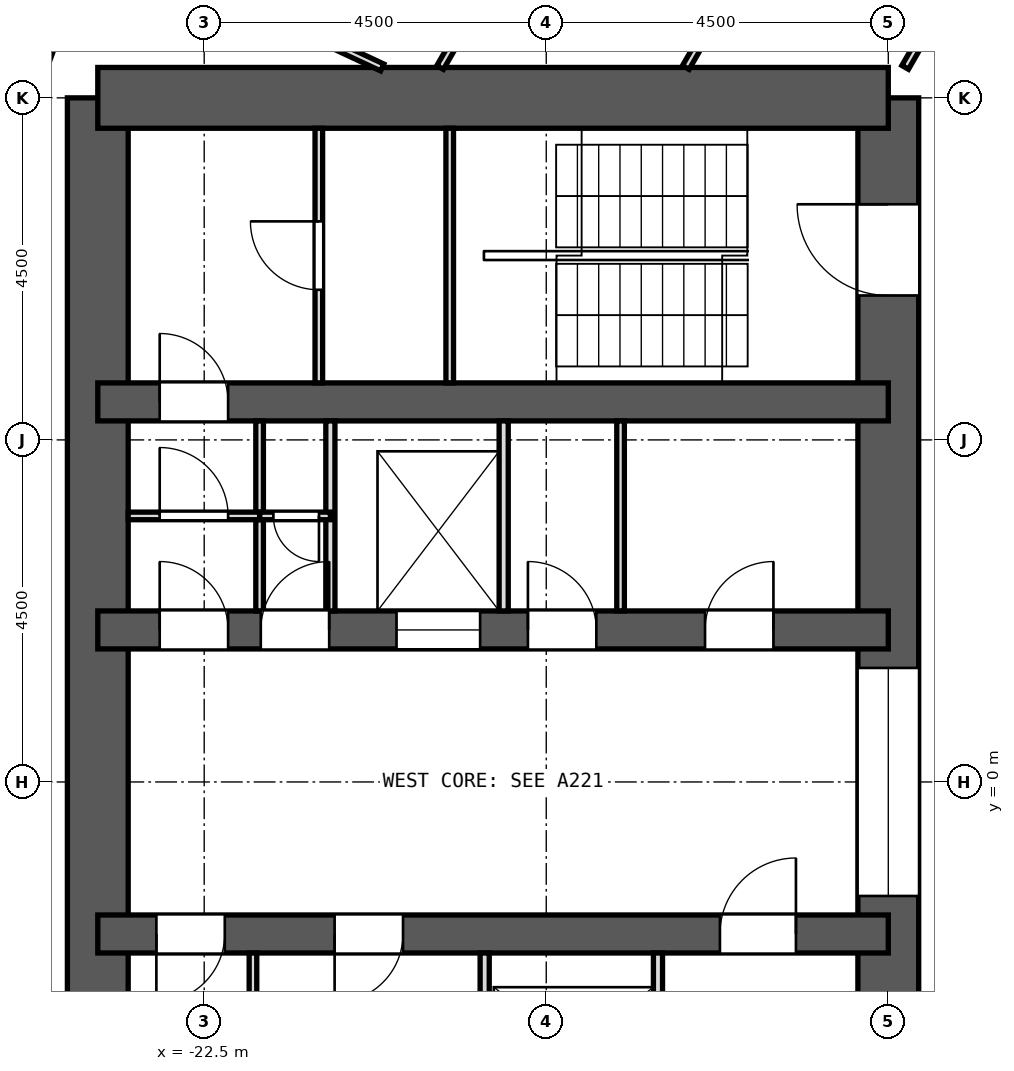
"""IFC4 building model, lengths in metres.
Left out: names, types, materials, properties, quantities, classifications, styles, units other than length and angle.
Written with IfcOpenShell. Run it as: python <this file> out.ifc"""

import sys

from ifc_helpers import new_model, si_unit, direction, frame, frame_2d, origin, place, context, subcontext, project, spatial, rectangle, extrude, element, fill, save


model = new_model("IFC4")
c1 = context("Model", 3, precision=1e-05, world=origin(), true_north=direction((0.0, 1.0)))
c2 = subcontext(c1, "Body", "Model", "MODEL_VIEW")
j1 = project(units=[si_unit("LENGTHUNIT", "METRE"), si_unit("PLANEANGLEUNIT", "RADIAN")], contexts=[c1])
p1 = place(None, origin())
s1 = spatial("IfcSite", under=j1, at=p1, CompositionType="ELEMENT")
p2 = place(p1, origin())
s2 = spatial("IfcBuilding", under=s1, at=p2, CompositionType="ELEMENT")
p3 = place(p2, frame((0.0, 0.0, 131.5)))
s3 = spatial("IfcBuildingStorey", under=s2, at=p3, CompositionType="ELEMENT", Elevation=131.5)
p4 = place(p3, frame((-13.5, -9.0, 0.0), z_axis=(0.0, 0.0, 1.0), x_axis=(0.0, 1.0, 0.0)))
e1 = element("IfcWall", 1, at=p4, inside=s3, PredefinedType="SHEAR", context=c2, shape_type="SweptSolid", body=[
    extrude(rectangle(XDim=18.0, YDim=0.8, at=frame_2d((9.0, 0.0))), origin(), (0.0, 0.0, 1.0), 3.3),
])
p5 = place(p4, frame((15.4, 0.0, 0.0)))
e2 = element("IfcOpeningElement", 2, at=p5, cuts=e1, PredefinedType="OPENING", context=c2, shape_type="SweptSolid", body=[
    extrude(rectangle(XDim=1.2, YDim=2.1, at=frame_2d((0.6, 1.05))), frame((0.0, 0.412, 0.0), z_axis=(0.0, -1.0, 0.0), x_axis=(1.0, 0.0, 0.0)), (0.0, 0.0, 1.0), 0.824),
])
p6 = place(p4, frame((1.4, 0.0, 0.0)))
e3 = element("IfcOpeningElement", 3, at=p6, cuts=e1, PredefinedType="OPENING", context=c2, shape_type="SweptSolid", body=[
    extrude(rectangle(XDim=1.2, YDim=2.1, at=frame_2d((0.6, 1.05))), frame((0.0, 0.412, 0.0), z_axis=(0.0, -1.0, 0.0), x_axis=(1.0, 0.0, 0.0)), (0.0, 0.0, 1.0), 0.824),
])
p7 = place(p4, frame((7.5, 0.0, 0.0)))
e4 = element("IfcOpeningElement", 4, at=p7, cuts=e1, PredefinedType="OPENING", context=c2, shape_type="SweptSolid", body=[
    extrude(rectangle(XDim=3.0, YDim=2.4, at=frame_2d((1.5, 1.2))), frame((0.0, 0.412, 0.0), z_axis=(0.0, -1.0, 0.0), x_axis=(1.0, 0.0, 0.0)), (0.0, 0.0, 1.0), 0.824),
])
p8 = place(p3, frame((-23.9, -9.0, 0.0), z_axis=(0.0, 0.0, 1.0), x_axis=(0.0, 1.0, 0.0)))
e5 = element("IfcWall", 5, at=p8, inside=s3, PredefinedType="SHEAR", context=c2, shape_type="SweptSolid", body=[
    extrude(rectangle(XDim=18.0, YDim=0.8, at=frame_2d((9.0, 0.0))), origin(), (0.0, 0.0, 1.0), 3.3),
])
p9 = place(p3, frame((-13.5, 9.0, 0.0), z_axis=(0.0, 0.0, 1.0), x_axis=(-1.0, 0.0, 0.0)))
e6 = element("IfcWall", 6, at=p9, inside=s3, PredefinedType="SHEAR", context=c2, shape_type="SweptSolid", body=[
    extrude(rectangle(XDim=10.4, YDim=0.8, at=frame_2d((5.2, 0.0))), origin(), (0.0, 0.0, 1.0), 3.3),
])
p10 = place(p3, frame((-13.5, 5.0, 0.0), z_axis=(0.0, 0.0, 1.0), x_axis=(-1.0, 0.0, 0.0)))
e7 = element("IfcWall", 7, at=p10, inside=s3, PredefinedType="SHEAR", context=c2, shape_type="SweptSolid", body=[
    extrude(rectangle(XDim=10.4, YDim=0.5, at=frame_2d((5.2, 0.0))), origin(), (0.0, 0.0, 1.0), 3.3),
])
p11 = place(p10, frame((8.686, 0.0, 0.0)))
e8 = element("IfcOpeningElement", 8, at=p11, cuts=e7, PredefinedType="OPENING", context=c2, shape_type="SweptSolid", body=[
    extrude(rectangle(XDim=0.9, YDim=2.1, at=frame_2d((0.45, 1.05))), frame((0.0, 0.262, 0.0), z_axis=(0.0, -1.0, 0.0), x_axis=(1.0, 0.0, 0.0)), (0.0, 0.0, 1.0), 0.524),
])
p12 = place(p3, frame((-13.5, 2.0, 0.0), z_axis=(0.0, 0.0, 1.0), x_axis=(-1.0, 0.0, 0.0)))
e9 = element("IfcWall", 9, at=p12, inside=s3, PredefinedType="SHEAR", context=c2, shape_type="SweptSolid", body=[
    extrude(rectangle(XDim=10.4, YDim=0.5, at=frame_2d((5.2, 0.0))), origin(), (0.0, 0.0, 1.0), 3.3),
])
p13 = place(p12, frame((5.37, 0.0, 0.0)))
e10 = element("IfcOpeningElement", 10, at=p13, cuts=e9, PredefinedType="OPENING", context=c2, shape_type="SweptSolid", body=[
    extrude(rectangle(XDim=1.1, YDim=2.1, at=frame_2d((0.55, 1.05))), frame((0.0, 0.262, 0.0), z_axis=(0.0, -1.0, 0.0), x_axis=(1.0, 0.0, 0.0)), (0.0, 0.0, 1.0), 0.524),
])
p14 = place(p12, frame((1.511, 0.0, 0.0)))
e11 = element("IfcOpeningElement", 11, at=p14, cuts=e9, PredefinedType="OPENING", context=c2, shape_type="SweptSolid", body=[
    extrude(rectangle(XDim=0.9, YDim=2.1, at=frame_2d((0.45, 1.05))), frame((0.0, 0.262, 0.0), z_axis=(0.0, -1.0, 0.0), x_axis=(1.0, 0.0, 0.0)), (0.0, 0.0, 1.0), 0.524),
])
p15 = place(p12, frame((3.841, 0.0, 0.0)))
e12 = element("IfcOpeningElement", 12, at=p15, cuts=e9, PredefinedType="OPENING", context=c2, shape_type="SweptSolid", body=[
    extrude(rectangle(XDim=0.9, YDim=2.1, at=frame_2d((0.45, 1.05))), frame((0.0, 0.262, 0.0), z_axis=(0.0, -1.0, 0.0), x_axis=(1.0, 0.0, 0.0)), (0.0, 0.0, 1.0), 0.524),
])
p16 = place(p12, frame((7.355, 0.0, 0.0)))
e13 = element("IfcOpeningElement", 13, at=p16, cuts=e9, PredefinedType="OPENING", context=c2, shape_type="SweptSolid", body=[
    extrude(rectangle(XDim=0.9, YDim=2.1, at=frame_2d((0.45, 1.05))), frame((0.0, 0.262, 0.0), z_axis=(0.0, -1.0, 0.0), x_axis=(1.0, 0.0, 0.0)), (0.0, 0.0, 1.0), 0.524),
])
p17 = place(p12, frame((8.686, 0.0, 0.0)))
e14 = element("IfcOpeningElement", 14, at=p17, cuts=e9, PredefinedType="OPENING", context=c2, shape_type="SweptSolid", body=[
    extrude(rectangle(XDim=0.9, YDim=2.1, at=frame_2d((0.45, 1.05))), frame((0.0, 0.262, 0.0), z_axis=(0.0, -1.0, 0.0), x_axis=(1.0, 0.0, 0.0)), (0.0, 0.0, 1.0), 0.524),
])
p18 = place(p3, frame((-13.5, -2.0, 0.0), z_axis=(0.0, 0.0, 1.0), x_axis=(-1.0, 0.0, 0.0)))
e15 = element("IfcWall", 15, at=p18, inside=s3, PredefinedType="SHEAR", context=c2, shape_type="SweptSolid", body=[
    extrude(rectangle(XDim=10.4, YDim=0.5, at=frame_2d((5.2, 0.0))), origin(), (0.0, 0.0, 1.0), 3.3),
])
p19 = place(p18, frame((1.215, 0.0, 0.0)))
e16 = element("IfcOpeningElement", 16, at=p19, cuts=e15, PredefinedType="OPENING", context=c2, shape_type="SweptSolid", body=[
    extrude(rectangle(XDim=1.0, YDim=2.1, at=frame_2d((0.5, 1.05))), frame((0.0, 0.262, 0.0), z_axis=(0.0, -1.0, 0.0), x_axis=(1.0, 0.0, 0.0)), (0.0, 0.0, 1.0), 0.524),
])
p20 = place(p18, frame((6.384, 0.0, 0.0)))
e17 = element("IfcOpeningElement", 17, at=p20, cuts=e15, PredefinedType="OPENING", context=c2, shape_type="SweptSolid", body=[
    extrude(rectangle(XDim=0.9, YDim=2.1, at=frame_2d((0.45, 1.05))), frame((0.0, 0.262, 0.0), z_axis=(0.0, -1.0, 0.0), x_axis=(1.0, 0.0, 0.0)), (0.0, 0.0, 1.0), 0.524),
])
p21 = place(p18, frame((8.729, 0.0, 0.0)))
e18 = element("IfcOpeningElement", 18, at=p21, cuts=e15, PredefinedType="OPENING", context=c2, shape_type="SweptSolid", body=[
    extrude(rectangle(XDim=0.9, YDim=2.1, at=frame_2d((0.45, 1.05))), frame((0.0, 0.262, 0.0), z_axis=(0.0, -1.0, 0.0), x_axis=(1.0, 0.0, 0.0)), (0.0, 0.0, 1.0), 0.524),
])
p22 = place(p3, frame((-24.369, 10.811, 0.0), z_axis=(0.0, 0.0, 1.0), x_axis=(-0.341990236633, -0.939703505393, 0.0)))
e19 = element("IfcWall", 19, at=p22, inside=s3, PredefinedType="SOLIDWALL", context=c2, shape_type="SweptSolid", body=[
    extrude(rectangle(XDim=3.648, YDim=0.6, at=frame_2d((1.824, 0.0))), origin(), (0.0, 0.0, 1.0), 2.8),
])
p23 = place(p3, frame((-13.237, 13.237, 0.0), z_axis=(0.0, 0.0, 1.0), x_axis=(0.707106781187, -0.707106781187, 0.0)))
e20 = element("IfcWall", 20, at=p23, inside=s3, PredefinedType="PARTITIONING", context=c2, shape_type="SweptSolid", body=[
    extrude(rectangle(XDim=7.615, YDim=0.125, at=frame_2d((3.807, 0.0))), origin(), (0.0, 0.0, 1.0), 2.8),
])
p24 = place(p3, frame((-23.26, 10.847, 0.0), z_axis=(0.0, 0.0, 1.0), x_axis=(0.906223222272, -0.422799564114, 0.0)))
e21 = element("IfcWall", 21, at=p24, inside=s3, PredefinedType="PARTITIONING", context=c2, shape_type="SweptSolid", body=[
    extrude(rectangle(XDim=3.423, YDim=0.1, at=frame_2d((1.711, 0.0))), origin(), (0.0, 0.0, 1.0), 2.8),
])
p25 = place(p3, frame((-16.164, 9.4, 0.0), z_axis=(0.0, 0.0, 1.0), x_axis=(0.499750133086, 0.866169616461, 0.0)))
e22 = element("IfcWall", 22, at=p25, inside=s3, PredefinedType="PARTITIONING", context=c2, shape_type="SweptSolid", body=[
    extrude(rectangle(XDim=1.527, YDim=0.1, at=frame_2d((0.764, 0.0))), origin(), (0.0, 0.0, 1.0), 2.8),
])
p26 = place(p3, frame((-19.396, 9.4, 0.0), z_axis=(0.0, 0.0, 1.0), x_axis=(0.500210961829, 0.865903570651, 0.0)))
e23 = element("IfcWall", 23, at=p26, inside=s3, PredefinedType="PARTITIONING", context=c2, shape_type="SweptSolid", body=[
    extrude(rectangle(XDim=1.831, YDim=0.1, at=frame_2d((0.916, 0.0))), origin(), (0.0, 0.0, 1.0), 2.8),
])
p27 = place(p3, frame((-13.278, 9.401, 0.0), z_axis=(0.0, 0.0, 1.0), x_axis=(0.498991260101, 0.866607017248, 0.0)))
e24 = element("IfcWall", 24, at=p27, inside=s3, PredefinedType="PARTITIONING", context=c2, shape_type="SweptSolid", body=[
    extrude(rectangle(XDim=0.414, YDim=0.1, at=frame_2d((0.207, 0.0))), origin(), (0.0, 0.0, 1.0), 2.8),
])
p28 = place(p3, frame((-17.022, 2.25, 0.0), z_axis=(0.0, 0.0, 1.0), x_axis=(0.0, 1.0, 0.0)))
e25 = element("IfcWall", 25, at=p28, inside=s3, PredefinedType="PARTITIONING", context=c2, shape_type="SweptSolid", body=[
    extrude(rectangle(XDim=2.5, YDim=0.1, at=frame_2d((1.25, 0.0))), origin(), (0.0, 0.0, 1.0), 2.8),
])
for number, where, z_axis, x_axis in (
    (26, (-18.56, 2.25, 0.0), (0.0, 0.0, 1.0), (0.0, 1.0, 0.0)),
    (27, (-20.84, 2.25, 0.0), (0.0, 0.0, 1.0), (0.0, 1.0, 0.0)),
):
    element("IfcWall", number, at=place(p3, frame(where, z_axis=z_axis, x_axis=x_axis)), inside=s3, PredefinedType="PARTITIONING", context=c2, shape_type="SweptSolid", body=[
        extrude(rectangle(XDim=2.5, YDim=0.12, at=frame_2d((1.25, 0.0))), origin(), (0.0, 0.0, 1.0), 2.8),
    ])
p29 = place(p3, frame((-21.771, 2.25, 0.0), z_axis=(0.0, 0.0, 1.0), x_axis=(0.0, 1.0, 0.0)))
e28 = element("IfcWall", 28, at=p29, inside=s3, PredefinedType="PARTITIONING", context=c2, shape_type="SweptSolid", body=[
    extrude(rectangle(XDim=2.5, YDim=0.1, at=frame_2d((1.25, 0.0))), origin(), (0.0, 0.0, 1.0), 2.8),
])
p30 = place(p3, frame((-16.53, -4.75, 0.0), z_axis=(0.0, 0.0, 1.0), x_axis=(0.0, 1.0, 0.0)))
e29 = element("IfcWall", 29, at=p30, inside=s3, PredefinedType="PARTITIONING", context=c2, shape_type="SweptSolid", body=[
    extrude(rectangle(XDim=2.5, YDim=0.12, at=frame_2d((1.25, 0.0))), origin(), (0.0, 0.0, 1.0), 2.8),
])
p31 = place(p30, frame((0.7, 0.0, 0.0)))
e30 = element("IfcOpeningElement", 30, at=p31, cuts=e29, PredefinedType="OPENING", context=c2, shape_type="SweptSolid", body=[
    extrude(rectangle(XDim=1.1, YDim=2.1, at=frame_2d((0.55, 1.05))), frame((0.0, 0.072, 0.0), z_axis=(0.0, -1.0, 0.0), x_axis=(1.0, 0.0, 0.0)), (0.0, 0.0, 1.0), 0.144),
])
p32 = place(p3, frame((-18.81, -4.75, 0.0), z_axis=(0.0, 0.0, 1.0), x_axis=(0.0, 1.0, 0.0)))
e31 = element("IfcWall", 31, at=p32, inside=s3, PredefinedType="PARTITIONING", context=c2, shape_type="SweptSolid", body=[
    extrude(rectangle(XDim=2.5, YDim=0.12, at=frame_2d((1.25, 0.0))), origin(), (0.0, 0.0, 1.0), 2.8),
])
p33 = place(p3, frame((-21.858, -4.75, 0.0), z_axis=(0.0, 0.0, 1.0), x_axis=(0.0, 1.0, 0.0)))
e32 = element("IfcWall", 32, at=p33, inside=s3, PredefinedType="PARTITIONING", context=c2, shape_type="SweptSolid", body=[
    extrude(rectangle(XDim=2.5, YDim=0.1, at=frame_2d((1.25, 0.0))), origin(), (0.0, 0.0, 1.0), 2.8),
])
p34 = place(p3, frame((-20.84, 3.5, 0.0), z_axis=(0.0, 0.0, 1.0), x_axis=(-1.0, 0.0, 0.0)))
e33 = element("IfcWall", 33, at=p34, inside=s3, PredefinedType="PARTITIONING", context=c2, shape_type="SweptSolid", body=[
    extrude(rectangle(XDim=0.931, YDim=0.1, at=frame_2d((0.465, 0.0))), origin(), (0.0, 0.0, 1.0), 2.8),
])
p35 = place(p34, frame((0.15, 0.0, 0.0)))
e34 = element("IfcOpeningElement", 34, at=p35, cuts=e33, PredefinedType="OPENING", context=c2, shape_type="SweptSolid", body=[
    extrude(rectangle(XDim=0.6, YDim=2.1, at=frame_2d((0.3, 1.05))), frame((0.0, 0.062, 0.0), z_axis=(0.0, -1.0, 0.0), x_axis=(1.0, 0.0, 0.0)), (0.0, 0.0, 1.0), 0.124),
])
p36 = place(p3, frame((-21.771, 3.5, 0.0), z_axis=(0.0, 0.0, 1.0), x_axis=(-1.0, 0.0, 0.0)))
e35 = element("IfcWall", 35, at=p36, inside=s3, PredefinedType="PARTITIONING", context=c2, shape_type="SweptSolid", body=[
    extrude(rectangle(XDim=1.729, YDim=0.1, at=frame_2d((0.865, 0.0))), origin(), (0.0, 0.0, 1.0), 2.8),
])
p37 = place(p36, frame((0.415, 0.0, 0.0)))
e36 = element("IfcOpeningElement", 36, at=p37, cuts=e35, PredefinedType="OPENING", context=c2, shape_type="SweptSolid", body=[
    extrude(rectangle(XDim=0.9, YDim=2.1, at=frame_2d((0.45, 1.05))), frame((0.0, 0.062, 0.0), z_axis=(0.0, -1.0, 0.0), x_axis=(1.0, 0.0, 0.0)), (0.0, 0.0, 1.0), 0.124),
])
p38 = place(p3, frame((-19.27, 5.25, 0.0), z_axis=(0.0, 0.0, 1.0), x_axis=(0.0, 1.0, 0.0)))
e37 = element("IfcWall", 37, at=p38, inside=s3, PredefinedType="PARTITIONING", context=c2, shape_type="SweptSolid", body=[
    extrude(rectangle(XDim=3.35, YDim=0.1, at=frame_2d((1.675, 0.0))), origin(), (0.0, 0.0, 1.0), 2.8),
])
p39 = place(p3, frame((-20.992, 5.25, 0.0), z_axis=(0.0, 0.0, 1.0), x_axis=(0.0, 1.0, 0.0)))
e38 = element("IfcWall", 38, at=p39, inside=s3, PredefinedType="PARTITIONING", context=c2, shape_type="SweptSolid", body=[
    extrude(rectangle(XDim=3.35, YDim=0.1, at=frame_2d((1.675, 0.0))), origin(), (0.0, 0.0, 1.0), 2.8),
])
p40 = place(p39, frame((1.225, 0.0, 0.0)))
e39 = element("IfcOpeningElement", 39, at=p40, cuts=e38, PredefinedType="OPENING", context=c2, shape_type="SweptSolid", body=[
    extrude(rectangle(XDim=0.9, YDim=2.1, at=frame_2d((0.45, 1.05))), frame((0.0, 0.062, 0.0), z_axis=(0.0, -1.0, 0.0), x_axis=(1.0, 0.0, 0.0)), (0.0, 0.0, 1.0), 0.124),
])
p41 = place(p13, origin())
e40 = element("IfcDoor", 40, at=p41, inside=s3, OperationType="DOUBLE_DOOR_SLIDING", PredefinedType="DOOR", context=c2, shape_type="SweptSolid", body=[
    extrude(rectangle(XDim=1.1, YDim=2.1, at=frame_2d((0.55, 1.05))), frame((0.0, 0.025, 0.0), z_axis=(0.0, -1.0, 0.0), x_axis=(1.0, 0.0, 0.0)), (0.0, 0.0, 1.0), 0.05),
])
fill(e10, e40)
p42 = place(p14, frame((0.9, 0.0, 0.0), z_axis=(0.0, 0.0, 1.0), x_axis=(-1.0, 0.0, 0.0)))
e41 = element("IfcDoor", 41, at=p42, inside=s3, OperationType="SINGLE_SWING_RIGHT", PredefinedType="DOOR", context=c2, shape_type="SweptSolid", body=[
    extrude(rectangle(XDim=0.9, YDim=2.1, at=frame_2d((0.45, 1.05))), frame((0.0, 0.025, 0.0), z_axis=(0.0, -1.0, 0.0), x_axis=(1.0, 0.0, 0.0)), (0.0, 0.0, 1.0), 0.05),
])
fill(e11, e41)
p43 = place(p15, frame((0.9, 0.0, 0.0), z_axis=(0.0, 0.0, 1.0), x_axis=(-1.0, 0.0, 0.0)))
e42 = element("IfcDoor", 42, at=p43, inside=s3, OperationType="SINGLE_SWING_LEFT", PredefinedType="DOOR", context=c2, shape_type="SweptSolid", body=[
    extrude(rectangle(XDim=0.9, YDim=2.1, at=frame_2d((0.45, 1.05))), frame((0.0, 0.025, 0.0), z_axis=(0.0, -1.0, 0.0), x_axis=(1.0, 0.0, 0.0)), (0.0, 0.0, 1.0), 0.05),
])
fill(e12, e42)
p44 = place(p16, frame((0.9, 0.0, 0.0), z_axis=(0.0, 0.0, 1.0), x_axis=(-1.0, 0.0, 0.0)))
e43 = element("IfcDoor", 43, at=p44, inside=s3, OperationType="SINGLE_SWING_RIGHT", PredefinedType="DOOR", context=c2, shape_type="SweptSolid", body=[
    extrude(rectangle(XDim=0.9, YDim=2.1, at=frame_2d((0.45, 1.05))), frame((0.0, 0.025, 0.0), z_axis=(0.0, -1.0, 0.0), x_axis=(1.0, 0.0, 0.0)), (0.0, 0.0, 1.0), 0.05),
])
fill(e13, e43)
p45 = place(p17, frame((0.9, 0.0, 0.0), z_axis=(0.0, 0.0, 1.0), x_axis=(-1.0, 0.0, 0.0)))
e44 = element("IfcDoor", 44, at=p45, inside=s3, OperationType="SINGLE_SWING_LEFT", PredefinedType="DOOR", context=c2, shape_type="SweptSolid", body=[
    extrude(rectangle(XDim=0.9, YDim=2.1, at=frame_2d((0.45, 1.05))), frame((0.0, 0.025, 0.0), z_axis=(0.0, -1.0, 0.0), x_axis=(1.0, 0.0, 0.0)), (0.0, 0.0, 1.0), 0.05),
])
fill(e14, e44)
p46 = place(p19, frame((1.0, 0.0, 0.0), z_axis=(0.0, 0.0, 1.0), x_axis=(-1.0, 0.0, 0.0)))
e45 = element("IfcDoor", 45, at=p46, inside=s3, OperationType="SINGLE_SWING_RIGHT", PredefinedType="DOOR", context=c2, shape_type="SweptSolid", body=[
    extrude(rectangle(XDim=1.0, YDim=2.1, at=frame_2d((0.5, 1.05))), frame((0.0, 0.025, 0.0), z_axis=(0.0, -1.0, 0.0), x_axis=(1.0, 0.0, 0.0)), (0.0, 0.0, 1.0), 0.05),
])
fill(e16, e45)
p47 = place(p20, origin())
e46 = element("IfcDoor", 46, at=p47, inside=s3, OperationType="SINGLE_SWING_RIGHT", PredefinedType="DOOR", context=c2, shape_type="SweptSolid", body=[
    extrude(rectangle(XDim=0.9, YDim=2.1, at=frame_2d((0.45, 1.05))), frame((0.0, 0.025, 0.0), z_axis=(0.0, -1.0, 0.0), x_axis=(1.0, 0.0, 0.0)), (0.0, 0.0, 1.0), 0.05),
])
fill(e17, e46)
p48 = place(p21, origin())
e47 = element("IfcDoor", 47, at=p48, inside=s3, OperationType="SINGLE_SWING_RIGHT", PredefinedType="DOOR", context=c2, shape_type="SweptSolid", body=[
    extrude(rectangle(XDim=0.9, YDim=2.1, at=frame_2d((0.45, 1.05))), frame((0.0, 0.025, 0.0), z_axis=(0.0, -1.0, 0.0), x_axis=(1.0, 0.0, 0.0)), (0.0, 0.0, 1.0), 0.05),
])
fill(e18, e47)
p49 = place(p35, origin())
e48 = element("IfcDoor", 48, at=p49, inside=s3, OperationType="SINGLE_SWING_LEFT", PredefinedType="DOOR", context=c2, shape_type="SweptSolid", body=[
    extrude(rectangle(XDim=0.6, YDim=2.1, at=frame_2d((0.3, 1.05))), frame((0.0, 0.025, 0.0), z_axis=(0.0, -1.0, 0.0), x_axis=(1.0, 0.0, 0.0)), (0.0, 0.0, 1.0), 0.05),
])
fill(e34, e48)
p50 = place(p37, frame((0.9, 0.0, 0.0), z_axis=(0.0, 0.0, 1.0), x_axis=(-1.0, 0.0, 0.0)))
e49 = element("IfcDoor", 49, at=p50, inside=s3, OperationType="SINGLE_SWING_LEFT", PredefinedType="DOOR", context=c2, shape_type="SweptSolid", body=[
    extrude(rectangle(XDim=0.9, YDim=2.1, at=frame_2d((0.45, 1.05))), frame((0.0, 0.025, 0.0), z_axis=(0.0, -1.0, 0.0), x_axis=(1.0, 0.0, 0.0)), (0.0, 0.0, 1.0), 0.05),
])
fill(e36, e49)
p51 = place(p40, origin())
e50 = element("IfcDoor", 50, at=p51, inside=s3, OperationType="SINGLE_SWING_RIGHT", PredefinedType="DOOR", context=c2, shape_type="SweptSolid", body=[
    extrude(rectangle(XDim=0.9, YDim=2.1, at=frame_2d((0.45, 1.05))), frame((0.0, 0.025, 0.0), z_axis=(0.0, -1.0, 0.0), x_axis=(1.0, 0.0, 0.0)), (0.0, 0.0, 1.0), 0.05),
])
fill(e39, e50)
p52 = place(p11, frame((0.9, 0.0, 0.0), z_axis=(0.0, 0.0, 1.0), x_axis=(-1.0, 0.0, 0.0)))
e51 = element("IfcDoor", 51, at=p52, inside=s3, OperationType="SINGLE_SWING_LEFT", PredefinedType="DOOR", context=c2, shape_type="SweptSolid", body=[
    extrude(rectangle(XDim=0.9, YDim=2.1, at=frame_2d((0.45, 1.05))), frame((0.0, 0.025, 0.0), z_axis=(0.0, -1.0, 0.0), x_axis=(1.0, 0.0, 0.0)), (0.0, 0.0, 1.0), 0.05),
])
fill(e8, e51)
p53 = place(p5, origin())
e52 = element("IfcDoor", 52, at=p53, inside=s3, OperationType="SINGLE_SWING_RIGHT", PredefinedType="DOOR", context=c2, shape_type="SweptSolid", body=[
    extrude(rectangle(XDim=1.2, YDim=2.1, at=frame_2d((0.6, 1.05))), frame((0.0, 0.025, 0.0), z_axis=(0.0, -1.0, 0.0), x_axis=(1.0, 0.0, 0.0)), (0.0, 0.0, 1.0), 0.05),
])
fill(e2, e52)
p54 = place(p7, origin())
e53 = element("IfcDoor", 53, at=p54, inside=s3, OperationType="DOUBLE_DOOR_SLIDING", PredefinedType="DOOR", context=c2, shape_type="SweptSolid", body=[
    extrude(rectangle(XDim=3.0, YDim=2.4, at=frame_2d((1.5, 1.2))), frame((0.0, 0.025, 0.0), z_axis=(0.0, -1.0, 0.0), x_axis=(1.0, 0.0, 0.0)), (0.0, 0.0, 1.0), 0.05),
])
fill(e4, e53)
save(model, sys.argv[1])
